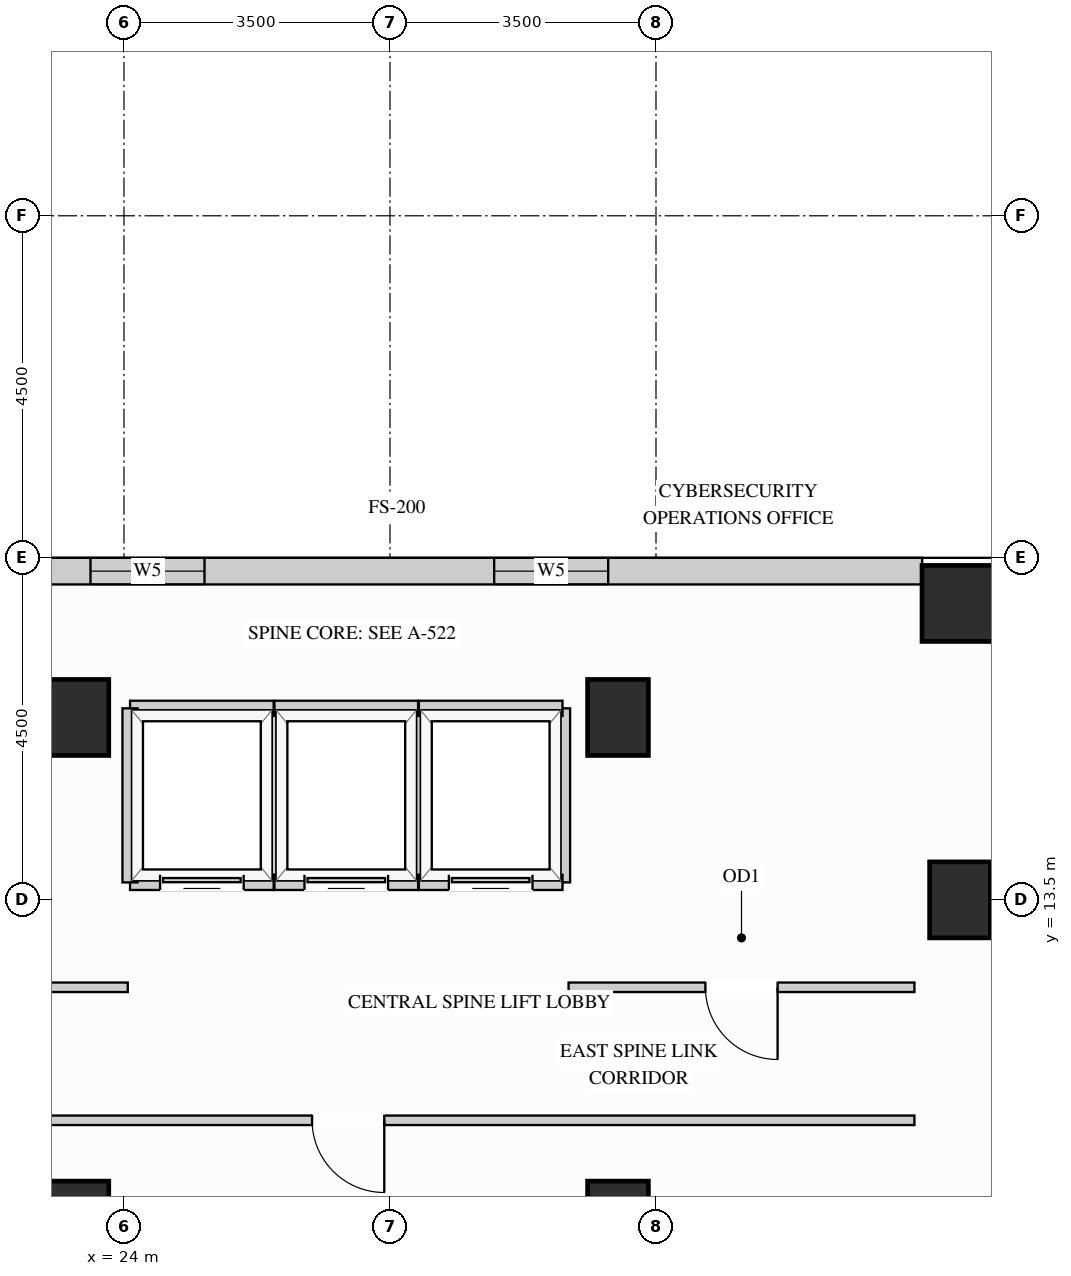
"""IFC4 building model, lengths in metres.
Left out: names, types, materials, properties, quantities, classifications, styles, units other than length and angle.
Written with IfcOpenShell. Run it as: python <this file> out.ifc"""

import sys

from ifc_helpers import new_model, si_unit, direction, frame, frame_2d, origin, origin_2d, place, context, subcontext, project, spatial, rectangle, extrude, source, transform, mapped, element, fill, save


model = new_model("IFC4")
c1 = context("Model", 3, precision=1e-05, world=origin(), true_north=direction((0.0, 1.0)))
c2 = subcontext(c1, "Body", "Model", "MODEL_VIEW")
j1 = project(units=[si_unit("LENGTHUNIT", "METRE"), si_unit("PLANEANGLEUNIT", "RADIAN")], contexts=[c1])
p1 = place(None, origin())
s1 = spatial("IfcSite", under=j1, at=p1, CompositionType="ELEMENT")
p2 = place(p1, origin())
s2 = spatial("IfcBuilding", under=s1, at=p2, CompositionType="ELEMENT")
p3 = place(p2, frame((0.0, 0.0, 168.3)))
s3 = spatial("IfcBuildingStorey", under=s2, at=p3, CompositionType="ELEMENT", Elevation=168.3)
m1 = source(origin(), c2, "Body", "SweptSolid", [
    extrude(rectangle(XDim=0.8, YDim=1.0, at=origin_2d()), origin(), (0.0, 0.0, 1.0), 3.4),
])
for number, where, z_axis, x_axis in (
    (1, (35.0, 13.5, 0.0), (0.0, 0.0, 1.0), (1.0, 0.0, 0.0)),
    (2, (23.4, 15.9, 0.0), (0.0, 0.0, 1.0), (1.0, 0.0, 0.0)),
    (3, (23.4, 9.3, 0.0), (0.0, 0.0, 1.0), (1.0, 0.0, 0.0)),
    (4, (30.5, 15.9, 0.0), (0.0, 0.0, 1.0), (1.0, 0.0, 0.0)),
    (5, (30.5, 9.3, 0.0), (0.0, 0.0, 1.0), (1.0, 0.0, 0.0)),
):
    element("IfcColumn", number, at=place(p3, frame(where, z_axis=z_axis, x_axis=x_axis)), inside=s3, PredefinedType="COLUMN", context=c2, shape_type="MappedRepresentation", body=[
        mapped(m1, transform((0.0, 0.0, 0.0), x_axis=(1.0, 0.0, 0.0), y_axis=(0.0, 1.0, 0.0), z_axis=(0.0, 0.0, 1.0))),
    ])
m2 = source(origin(), c2, "Body", "SweptSolid", [
    extrude(rectangle(XDim=1.0, YDim=1.0, at=origin_2d()), origin(), (0.0, 0.0, 1.0), 3.4),
])
p4 = place(p3, frame((35.0, 17.4, 0.0), z_axis=(0.0, 0.0, 1.0), x_axis=(1.0, 0.0, 0.0)))
e6 = element("IfcColumn", 6, at=p4, inside=s3, PredefinedType="COLUMN", context=c2, shape_type="MappedRepresentation", body=[
    mapped(m2, transform((0.0, 0.0, 0.0), x_axis=(1.0, 0.0, 0.0), y_axis=(0.0, 1.0, 0.0), z_axis=(0.0, 0.0, 1.0))),
])
p5 = place(p3, frame((34.502, 17.825, 0.0), z_axis=(0.0, 0.0, 1.0), x_axis=(-1.0, 0.0, 0.0)))
e7 = element("IfcWall", 7, at=p5, inside=s3, PredefinedType="SOLIDWALL", context=c2, shape_type="SweptSolid", body=[
    extrude(rectangle(XDim=15.104, YDim=0.35, at=frame_2d((7.552, 0.0))), origin(), (0.0, 0.0, 1.0), 3.385),
])
p6 = place(p5, frame((4.131, 0.0, 0.78)))
e8 = element("IfcOpeningElement", 8, at=p6, cuts=e7, PredefinedType="OPENING", context=c2, shape_type="SweptSolid", body=[
    extrude(rectangle(XDim=1.5, YDim=2.0, at=frame_2d((0.75, 1.0))), frame((0.0, 0.185, 0.0), z_axis=(0.0, -1.0, 0.0), x_axis=(1.0, 0.0, 0.0)), (0.0, 0.0, 1.0), 0.37),
])
p7 = place(p5, frame((9.442, 0.0, 0.78)))
e9 = element("IfcOpeningElement", 9, at=p7, cuts=e7, PredefinedType="OPENING", context=c2, shape_type="SweptSolid", body=[
    extrude(rectangle(XDim=1.5, YDim=2.0, at=frame_2d((0.75, 1.0))), frame((0.0, 0.185, 0.0), z_axis=(0.0, -1.0, 0.0), x_axis=(1.0, 0.0, 0.0)), (0.0, 0.0, 1.0), 0.37),
])
p8 = place(p3, frame((29.85, 12.35, 0.0), z_axis=(0.0, 0.0, 1.0), x_axis=(1.0, 0.0, 0.0)))
e10 = element("IfcWall", 10, at=p8, inside=s3, PredefinedType="PARTITIONING", context=c2, shape_type="SweptSolid", body=[
    extrude(rectangle(XDim=4.55, YDim=0.125, at=frame_2d((2.275, 0.0))), origin(), (0.0, 0.0, 1.0), 3.385),
])
p9 = place(p8, frame((1.8, 0.0, 0.0)))
e11 = element("IfcOpeningElement", 11, at=p9, cuts=e10, PredefinedType="OPENING", context=c2, shape_type="SweptSolid", body=[
    extrude(rectangle(XDim=0.95, YDim=2.15, at=frame_2d((0.475, 1.075))), frame((0.0, 0.073, 0.0), z_axis=(0.0, -1.0, 0.0), x_axis=(1.0, 0.0, 0.0)), (0.0, 0.0, 1.0), 0.145),
])
p10 = place(p3, frame((19.5, 12.35, 0.0), z_axis=(0.0, 0.0, 1.0), x_axis=(1.0, 0.0, 0.0)))
e12 = element("IfcWall", 12, at=p10, inside=s3, PredefinedType="PARTITIONING", context=c2, shape_type="SweptSolid", body=[
    extrude(rectangle(XDim=4.55, YDim=0.125, at=frame_2d((2.275, 0.0))), origin(), (0.0, 0.0, 1.0), 3.385),
])
p11 = place(p10, frame((1.8, 0.0, 0.0)))
e13 = element("IfcOpeningElement", 13, at=p11, cuts=e12, PredefinedType="OPENING", context=c2, shape_type="SweptSolid", body=[
    extrude(rectangle(XDim=0.95, YDim=2.15, at=frame_2d((0.475, 1.075))), frame((0.0, 0.073, 0.0), z_axis=(0.0, -1.0, 0.0), x_axis=(1.0, 0.0, 0.0)), (0.0, 0.0, 1.0), 0.145),
])
p12 = place(p3, frame((19.5, 10.6, 0.0), z_axis=(0.0, 0.0, 1.0), x_axis=(1.0, 0.0, 0.0)))
e14 = element("IfcWall", 14, at=p12, inside=s3, PredefinedType="PARTITIONING", context=c2, shape_type="SweptSolid", body=[
    extrude(rectangle(XDim=14.9, YDim=0.125, at=frame_2d((7.45, 0.0))), origin(), (0.0, 0.0, 1.0), 3.385),
])
p13 = place(p12, frame((6.975, 0.0, 0.0)))
e15 = element("IfcOpeningElement", 15, at=p13, cuts=e14, PredefinedType="OPENING", context=c2, shape_type="SweptSolid", body=[
    extrude(rectangle(XDim=0.95, YDim=2.15, at=frame_2d((0.475, 1.075))), frame((0.0, 0.073, 0.0), z_axis=(0.0, -1.0, 0.0), x_axis=(1.0, 0.0, 0.0)), (0.0, 0.0, 1.0), 0.145),
])
m3 = source(origin(), c2, "Body", "SweptSolid", [
    extrude(rectangle(XDim=2.29, YDim=0.2, at=frame_2d((1.145, 0.0))), origin(), (0.0, 0.0, 1.0), 3.385),
])
p14 = place(p3, frame((25.97, 13.73, 0.0), z_axis=(0.0, 0.0, 1.0), x_axis=(0.0, 1.0, 0.0)))
e16 = element("IfcWall", 16, at=p14, inside=s3, PredefinedType="PARTITIONING", context=c2, shape_type="MappedRepresentation", body=[
    mapped(m3, transform((0.0, 0.0, 0.0), x_axis=(1.0, 0.0, 0.0), y_axis=(0.0, 1.0, 0.0), z_axis=(0.0, 0.0, 1.0))),
])
m4 = source(origin(), c2, "Body", "SweptSolid", [
    extrude(rectangle(XDim=1.89, YDim=0.2, at=frame_2d((0.945, 0.0))), origin(), (0.0, 0.0, 1.0), 2.773),
])
p15 = place(p3, frame((24.08, 16.02, 0.0), z_axis=(0.0, 0.0, 1.0), x_axis=(1.0, 0.0, 0.0)))
e17 = element("IfcWall", 17, at=p15, inside=s3, PredefinedType="PARTITIONING", context=c2, shape_type="MappedRepresentation", body=[
    mapped(m4, transform((0.0, 0.0, 0.0), x_axis=(1.0, 0.0, 0.0), y_axis=(0.0, 1.0, 0.0), z_axis=(0.0, 0.0, 1.0))),
])
p16 = place(p3, frame((24.08, 13.73, 0.0), z_axis=(0.0, 0.0, 1.0), x_axis=(1.0, 0.0, 0.0)))
e18 = element("IfcWall", 18, at=p16, inside=s3, PredefinedType="PARTITIONING", context=c2, shape_type="SweptSolid", body=[
    extrude(rectangle(XDim=1.89, YDim=0.2, at=frame_2d((0.945, 0.0))), origin(), (0.0, 0.0, 1.0), 2.466),
])
p17 = place(p16, frame((0.395, 0.0, 0.0)))
e19 = element("IfcOpeningElement", 19, at=p17, cuts=e18, PredefinedType="OPENING", context=c2, shape_type="SweptSolid", body=[
    extrude(rectangle(XDim=1.1, YDim=2.2, at=frame_2d((0.55, 1.1))), frame((0.0, 0.11, 0.0), z_axis=(0.0, -1.0, 0.0), x_axis=(1.0, 0.0, 0.0)), (0.0, 0.0, 1.0), 0.22),
])
for number, where, z_axis, x_axis in (
    (20, (24.08, 13.73, 0.0), (0.0, 0.0, 1.0), (0.0, 1.0, 0.0)),
    (21, (27.87, 13.73, 0.0), (0.0, 0.0, 1.0), (0.0, 1.0, 0.0)),
):
    element("IfcWall", number, at=place(p3, frame(where, z_axis=z_axis, x_axis=x_axis)), inside=s3, PredefinedType="PARTITIONING", context=c2, shape_type="MappedRepresentation", body=[
        mapped(m3, transform((0.0, 0.0, 0.0), x_axis=(1.0, 0.0, 0.0), y_axis=(0.0, 1.0, 0.0), z_axis=(0.0, 0.0, 1.0))),
    ])
m5 = source(origin(), c2, "Body", "SweptSolid", [
    extrude(rectangle(XDim=1.89, YDim=0.2, at=frame_2d((0.945, 0.0))), origin(), (0.0, 0.0, 1.0), 2.773),
])
p18 = place(p3, frame((25.98, 16.02, 0.0), z_axis=(0.0, 0.0, 1.0), x_axis=(1.0, 0.0, 0.0)))
e22 = element("IfcWall", 22, at=p18, inside=s3, PredefinedType="PARTITIONING", context=c2, shape_type="MappedRepresentation", body=[
    mapped(m5, transform((0.0, 0.0, 0.0), x_axis=(1.0, 0.0, 0.0), y_axis=(0.0, 1.0, 0.0), z_axis=(0.0, 0.0, 1.0))),
])
p19 = place(p3, frame((25.98, 13.73, 0.0), z_axis=(0.0, 0.0, 1.0), x_axis=(1.0, 0.0, 0.0)))
e23 = element("IfcWall", 23, at=p19, inside=s3, PredefinedType="PARTITIONING", context=c2, shape_type="SweptSolid", body=[
    extrude(rectangle(XDim=1.89, YDim=0.2, at=frame_2d((0.945, 0.0))), origin(), (0.0, 0.0, 1.0), 2.466),
])
p20 = place(p19, frame((0.395, 0.0, 0.0)))
e24 = element("IfcOpeningElement", 24, at=p20, cuts=e23, PredefinedType="OPENING", context=c2, shape_type="SweptSolid", body=[
    extrude(rectangle(XDim=1.1, YDim=2.2, at=frame_2d((0.55, 1.1))), frame((0.0, 0.11, 0.0), z_axis=(0.0, -1.0, 0.0), x_axis=(1.0, 0.0, 0.0)), (0.0, 0.0, 1.0), 0.22),
])
p21 = place(p3, frame((29.77, 13.73, 0.0), z_axis=(0.0, 0.0, 1.0), x_axis=(0.0, 1.0, 0.0)))
e25 = element("IfcWall", 25, at=p21, inside=s3, PredefinedType="PARTITIONING", context=c2, shape_type="MappedRepresentation", body=[
    mapped(m3, transform((0.0, 0.0, 0.0), x_axis=(1.0, 0.0, 0.0), y_axis=(0.0, 1.0, 0.0), z_axis=(0.0, 0.0, 1.0))),
])
p22 = place(p3, frame((27.88, 16.02, 0.0), z_axis=(0.0, 0.0, 1.0), x_axis=(1.0, 0.0, 0.0)))
e26 = element("IfcWall", 26, at=p22, inside=s3, PredefinedType="PARTITIONING", context=c2, shape_type="MappedRepresentation", body=[
    mapped(m5, transform((0.0, 0.0, 0.0), x_axis=(1.0, 0.0, 0.0), y_axis=(0.0, 1.0, 0.0), z_axis=(0.0, 0.0, 1.0))),
])
p23 = place(p3, frame((27.88, 13.73, 0.0), z_axis=(0.0, 0.0, 1.0), x_axis=(1.0, 0.0, 0.0)))
e27 = element("IfcWall", 27, at=p23, inside=s3, PredefinedType="PARTITIONING", context=c2, shape_type="SweptSolid", body=[
    extrude(rectangle(XDim=1.89, YDim=0.2, at=frame_2d((0.945, 0.0))), origin(), (0.0, 0.0, 1.0), 2.466),
])
p24 = place(p23, frame((0.395, 0.0, 0.0)))
e28 = element("IfcOpeningElement", 28, at=p24, cuts=e27, PredefinedType="OPENING", context=c2, shape_type="SweptSolid", body=[
    extrude(rectangle(XDim=1.1, YDim=2.2, at=frame_2d((0.55, 1.1))), frame((0.0, 0.11, 0.0), z_axis=(0.0, -1.0, 0.0), x_axis=(1.0, 0.0, 0.0)), (0.0, 0.0, 1.0), 0.22),
])
m6 = source(origin(), c2, "Body", "SweptSolid", [
    extrude(rectangle(XDim=1.1, YDim=2.2, at=frame_2d((0.55, 1.1))), frame((0.0, 0.025, 0.0), z_axis=(0.0, -1.0, 0.0), x_axis=(1.0, 0.0, 0.0)), (0.0, 0.0, 1.0), 0.05),
])
p25 = place(p17, origin())
e29 = element("IfcDoor", 29, at=p25, inside=s3, OperationType="SLIDING_TO_LEFT", PredefinedType="DOOR", context=c2, shape_type="MappedRepresentation", body=[
    mapped(m6, transform((0.0, 0.0, 0.0), x_axis=(1.0, 0.0, 0.0), y_axis=(0.0, 1.0, 0.0), z_axis=(0.0, 0.0, 1.0))),
])
fill(e19, e29)
p26 = place(p20, origin())
e30 = element("IfcDoor", 30, at=p26, inside=s3, OperationType="SLIDING_TO_LEFT", PredefinedType="DOOR", context=c2, shape_type="MappedRepresentation", body=[
    mapped(m6, transform((0.0, 0.0, 0.0), x_axis=(1.0, 0.0, 0.0), y_axis=(0.0, 1.0, 0.0), z_axis=(0.0, 0.0, 1.0))),
])
fill(e24, e30)
p27 = place(p24, origin())
e31 = element("IfcDoor", 31, at=p27, inside=s3, OperationType="SLIDING_TO_LEFT", PredefinedType="DOOR", context=c2, shape_type="MappedRepresentation", body=[
    mapped(m6, transform((0.0, 0.0, 0.0), x_axis=(1.0, 0.0, 0.0), y_axis=(0.0, 1.0, 0.0), z_axis=(0.0, 0.0, 1.0))),
])
fill(e28, e31)
m7 = source(origin(), c2, "Body", "SweptSolid", [
    extrude(rectangle(XDim=0.95, YDim=2.15, at=frame_2d((0.475, 1.075))), frame((0.0, 0.025, 0.0), z_axis=(0.0, -1.0, 0.0), x_axis=(1.0, 0.0, 0.0)), (0.0, 0.0, 1.0), 0.05),
])
p28 = place(p9, origin())
e32 = element("IfcDoor", 32, at=p28, inside=s3, OperationType="SINGLE_SWING_RIGHT", PredefinedType="DOOR", context=c2, shape_type="MappedRepresentation", body=[
    mapped(m7, transform((0.0, 0.0, 0.0), x_axis=(1.0, 0.0, 0.0), y_axis=(0.0, 1.0, 0.0), z_axis=(0.0, 0.0, 1.0))),
])
fill(e11, e32)
p29 = place(p13, origin())
e33 = element("IfcDoor", 33, at=p29, inside=s3, OperationType="SINGLE_SWING_RIGHT", PredefinedType="DOOR", context=c2, shape_type="MappedRepresentation", body=[
    mapped(m7, transform((0.0, 0.0, 0.0), x_axis=(1.0, 0.0, 0.0), y_axis=(0.0, 1.0, 0.0), z_axis=(0.0, 0.0, 1.0))),
])
fill(e15, e33)
m8 = source(origin(), c2, "Body", "SweptSolid", [
    extrude(rectangle(XDim=1.5, YDim=2.0, at=frame_2d((0.75, 1.0))), frame((0.0, 0.03, 0.0), z_axis=(0.0, -1.0, 0.0), x_axis=(1.0, 0.0, 0.0)), (0.0, 0.0, 1.0), 0.06),
])
p30 = place(p6, origin())
e34 = element("IfcWindow", 34, at=p30, inside=s3, PartitioningType="SINGLE_PANEL", PredefinedType="WINDOW", context=c2, shape_type="MappedRepresentation", body=[
    mapped(m8, transform((0.0, 0.0, 0.0), x_axis=(1.0, 0.0, 0.0), y_axis=(0.0, 1.0, 0.0), z_axis=(0.0, 0.0, 1.0))),
])
fill(e8, e34)
p31 = place(p7, origin())
e35 = element("IfcWindow", 35, at=p31, inside=s3, PartitioningType="SINGLE_PANEL", PredefinedType="WINDOW", context=c2, shape_type="MappedRepresentation", body=[
    mapped(m8, transform((0.0, 0.0, 0.0), x_axis=(1.0, 0.0, 0.0), y_axis=(0.0, 1.0, 0.0), z_axis=(0.0, 0.0, 1.0))),
])
fill(e9, e35)
save(model, sys.argv[1])
